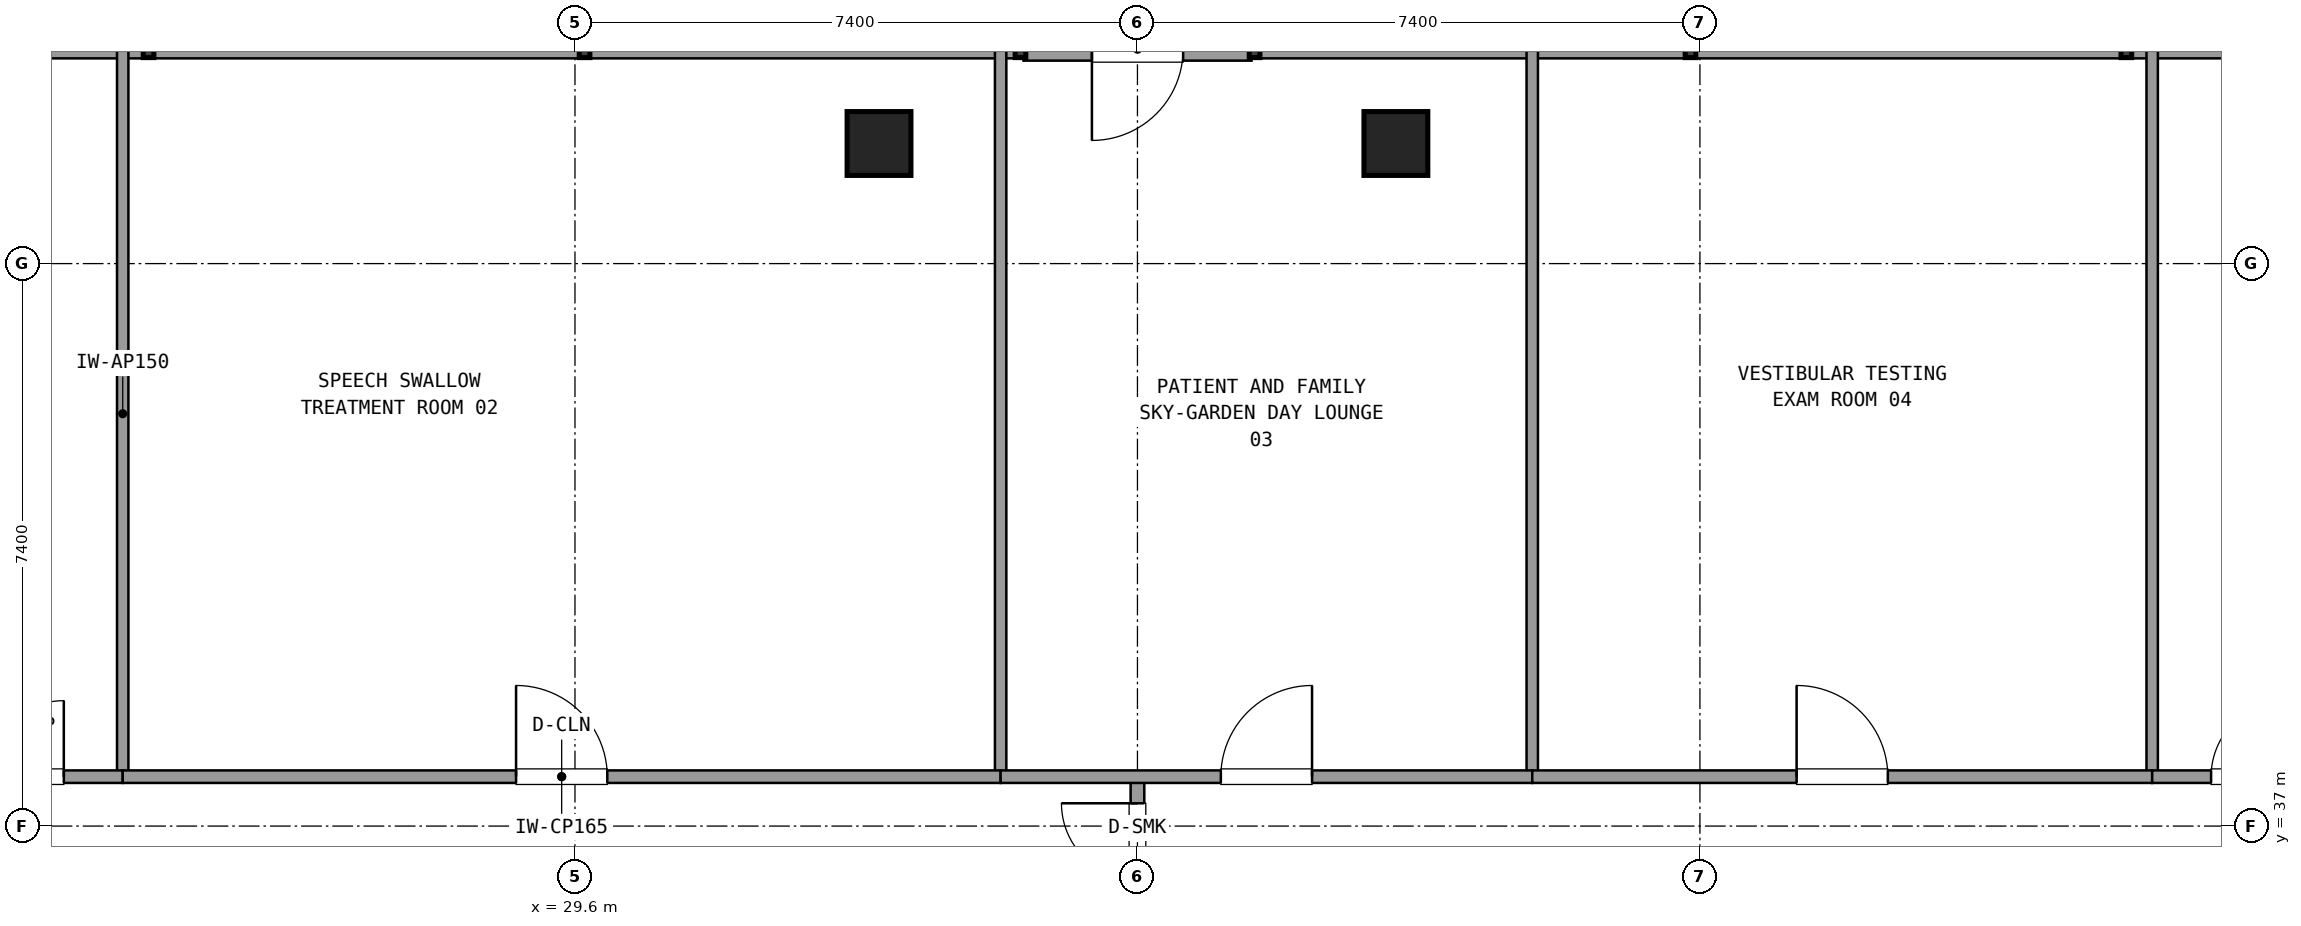
"""IFC4 building model, lengths in metres.
Left out: names, types, materials, properties, quantities, classifications, styles, units other than length and angle.
Written with IfcOpenShell. Run it as: python <this file> out.ifc"""

import sys

from ifc_helpers import new_model, si_unit, direction, frame, frame_2d, origin, origin_2d, place, context, subcontext, project, spatial, rectangle, extrude, element, fill, save


model = new_model("IFC4")
c1 = context("Model", 3, precision=1e-05, world=origin(), true_north=direction((0.0, 1.0)))
c2 = subcontext(c1, "Body", "Model", "MODEL_VIEW")
j1 = project(units=[si_unit("LENGTHUNIT", "METRE"), si_unit("PLANEANGLEUNIT", "RADIAN")], contexts=[c1])
p1 = place(None, origin())
s1 = spatial("IfcSite", under=j1, at=p1, CompositionType="ELEMENT")
p2 = place(p1, origin())
s2 = spatial("IfcBuilding", under=s1, at=p2, CompositionType="ELEMENT")
p3 = place(p2, frame((0.0, 0.0, 253.62)))
s3 = spatial("IfcBuildingStorey", under=s2, at=p3, CompositionType="ELEMENT", Elevation=253.62)
for number, where, z_axis, x_axis in (
    (1, (40.4, 45.98, 0.0), (0.0, 0.0, 1.0), (1.0, 0.0, 0.0)),
    (2, (33.6, 45.98, 0.0), (0.0, 0.0, 1.0), (1.0, 0.0, 0.0)),
):
    element("IfcColumn", number, at=place(p3, frame(where, z_axis=z_axis, x_axis=x_axis)), inside=s3, PredefinedType="COLUMN", context=c2, shape_type="SweptSolid", body=[
        extrude(rectangle(XDim=0.84, YDim=0.84, at=origin_2d()), origin(), (0.0, 0.0, 1.0), 3.6),
    ])
p4 = place(p3, frame((38.501, 47.22, 0.0), z_axis=(0.0, 0.0, 1.0), x_axis=(-1.0, 0.0, 0.0)))
e3 = element("IfcWall", 3, at=p4, inside=s3, PredefinedType="SOLIDWALL", context=c2, shape_type="SweptSolid", body=[
    extrude(rectangle(XDim=3.0, YDim=0.3, at=frame_2d((1.5, 0.0))), origin(), (0.0, 0.0, 1.0), 2.69),
])
p5 = place(p4, frame((0.9, 0.0, 0.0)))
e4 = element("IfcOpeningElement", 4, at=p5, cuts=e3, PredefinedType="OPENING", context=c2, shape_type="SweptSolid", body=[
    extrude(rectangle(XDim=1.2, YDim=2.2, at=frame_2d((0.6, 1.1))), frame((0.0, 0.16, 0.0), z_axis=(0.0, -1.0, 0.0), x_axis=(1.0, 0.0, 0.0)), (0.0, 0.0, 1.0), 0.32),
])
p6 = place(p3, frame((55.745, 47.22, 0.0), z_axis=(0.0, 0.0, 1.0), x_axis=(-1.0, 0.0, 0.0)))
e5 = element("IfcWall", 5, at=p6, inside=s3, PredefinedType="SOLIDWALL", context=c2, shape_type="SweptSolid", body=[
    extrude(rectangle(XDim=17.204, YDim=0.24, at=frame_2d((8.602, 0.0))), origin(), (0.0, 0.0, 1.0), 0.85),
])
p7 = place(p3, frame((35.461, 47.22, 0.0), z_axis=(0.0, 0.0, 1.0), x_axis=(-1.0, 0.0, 0.0)))
e6 = element("IfcWall", 6, at=p7, inside=s3, PredefinedType="SOLIDWALL", context=c2, shape_type="SweptSolid", body=[
    extrude(rectangle(XDim=17.206, YDim=0.24, at=frame_2d((8.603, 0.0))), origin(), (0.0, 0.0, 1.0), 0.85),
])
p8 = place(p3, frame((37.0, 34.95, 0.0), z_axis=(0.0, 0.0, 1.0), x_axis=(0.0, 1.0, 0.0)))
e7 = element("IfcWall", 7, at=p8, inside=s3, PredefinedType="PARTITIONING", context=c2, shape_type="SweptSolid", body=[
    extrude(rectangle(XDim=2.7, YDim=0.18, at=frame_2d((1.35, 0.0))), origin(), (0.0, 0.0, 1.0), 2.61),
])
p9 = place(p8, frame((0.35, 0.0, 0.0)))
e8 = element("IfcOpeningElement", 8, at=p9, cuts=e7, PredefinedType="OPENING", context=c2, shape_type="SweptSolid", body=[
    extrude(rectangle(XDim=2.0, YDim=2.2, at=frame_2d((1.0, 1.1))), frame((0.0, 0.1, 0.0), z_axis=(0.0, -1.0, 0.0), x_axis=(1.0, 0.0, 0.0)), (0.0, 0.0, 1.0), 0.2),
])
p10 = place(p3, frame((23.65, 37.65, 0.0), z_axis=(0.0, 0.0, 1.0), x_axis=(0.0, 1.0, 0.0)))
e9 = element("IfcWall", 9, at=p10, inside=s3, PredefinedType="PARTITIONING", context=c2, shape_type="SweptSolid", body=[
    extrude(rectangle(XDim=9.55, YDim=0.15, at=frame_2d((4.775, 0.0))), origin(), (0.0, 0.0, 1.0), 2.61),
])
p11 = place(p3, frame((21.1, 37.65, 0.0), z_axis=(0.0, 0.0, 1.0), x_axis=(1.0, 0.0, 0.0)))
e10 = element("IfcWall", 10, at=p11, inside=s3, PredefinedType="PARTITIONING", context=c2, shape_type="SweptSolid", body=[
    extrude(rectangle(XDim=2.55, YDim=0.165, at=frame_2d((1.275, 0.0))), origin(), (0.0, 0.0, 1.0), 2.61),
])
p12 = place(p11, frame((0.775, 0.0, 0.0)))
e11 = element("IfcOpeningElement", 11, at=p12, cuts=e10, PredefinedType="OPENING", context=c2, shape_type="SweptSolid", body=[
    extrude(rectangle(XDim=1.0, YDim=2.15, at=frame_2d((0.5, 1.075))), frame((0.0, 0.093, 0.0), z_axis=(0.0, -1.0, 0.0), x_axis=(1.0, 0.0, 0.0)), (0.0, 0.0, 1.0), 0.185),
])
p13 = place(p3, frame((35.2, 37.65, 0.0), z_axis=(0.0, 0.0, 1.0), x_axis=(0.0, 1.0, 0.0)))
e12 = element("IfcWall", 12, at=p13, inside=s3, PredefinedType="PARTITIONING", context=c2, shape_type="SweptSolid", body=[
    extrude(rectangle(XDim=9.55, YDim=0.15, at=frame_2d((4.775, 0.0))), origin(), (0.0, 0.0, 1.0), 2.61),
])
p14 = place(p3, frame((23.65, 37.65, 0.0), z_axis=(0.0, 0.0, 1.0), x_axis=(1.0, 0.0, 0.0)))
e13 = element("IfcWall", 13, at=p14, inside=s3, PredefinedType="PARTITIONING", context=c2, shape_type="SweptSolid", body=[
    extrude(rectangle(XDim=11.55, YDim=0.165, at=frame_2d((5.775, 0.0))), origin(), (0.0, 0.0, 1.0), 2.61),
])
p15 = place(p14, frame((5.175, 0.0, 0.0)))
e14 = element("IfcOpeningElement", 14, at=p15, cuts=e13, PredefinedType="OPENING", context=c2, shape_type="SweptSolid", body=[
    extrude(rectangle(XDim=1.2, YDim=2.15, at=frame_2d((0.6, 1.075))), frame((0.0, 0.093, 0.0), z_axis=(0.0, -1.0, 0.0), x_axis=(1.0, 0.0, 0.0)), (0.0, 0.0, 1.0), 0.185),
])
p16 = place(p3, frame((42.194, 37.65, 0.0), z_axis=(0.0, 0.0, 1.0), x_axis=(0.0, 1.0, 0.0)))
e15 = element("IfcWall", 15, at=p16, inside=s3, PredefinedType="PARTITIONING", context=c2, shape_type="SweptSolid", body=[
    extrude(rectangle(XDim=9.55, YDim=0.15, at=frame_2d((4.775, 0.0))), origin(), (0.0, 0.0, 1.0), 2.61),
])
p17 = place(p3, frame((35.2, 37.65, 0.0), z_axis=(0.0, 0.0, 1.0), x_axis=(1.0, 0.0, 0.0)))
e16 = element("IfcWall", 16, at=p17, inside=s3, PredefinedType="PARTITIONING", context=c2, shape_type="SweptSolid", body=[
    extrude(rectangle(XDim=6.994, YDim=0.165, at=frame_2d((3.497, 0.0))), origin(), (0.0, 0.0, 1.0), 2.61),
])
p18 = place(p17, frame((2.897, 0.0, 0.0)))
e17 = element("IfcOpeningElement", 17, at=p18, cuts=e16, PredefinedType="OPENING", context=c2, shape_type="SweptSolid", body=[
    extrude(rectangle(XDim=1.2, YDim=2.15, at=frame_2d((0.6, 1.075))), frame((0.0, 0.093, 0.0), z_axis=(0.0, -1.0, 0.0), x_axis=(1.0, 0.0, 0.0)), (0.0, 0.0, 1.0), 0.185),
])
p19 = place(p3, frame((50.35, 37.65, 0.0), z_axis=(0.0, 0.0, 1.0), x_axis=(0.0, 1.0, 0.0)))
e18 = element("IfcWall", 18, at=p19, inside=s3, PredefinedType="PARTITIONING", context=c2, shape_type="SweptSolid", body=[
    extrude(rectangle(XDim=9.55, YDim=0.15, at=frame_2d((4.775, 0.0))), origin(), (0.0, 0.0, 1.0), 2.61),
])
p20 = place(p3, frame((42.194, 37.65, 0.0), z_axis=(0.0, 0.0, 1.0), x_axis=(1.0, 0.0, 0.0)))
e19 = element("IfcWall", 19, at=p20, inside=s3, PredefinedType="PARTITIONING", context=c2, shape_type="SweptSolid", body=[
    extrude(rectangle(XDim=8.156, YDim=0.165, at=frame_2d((4.078, 0.0))), origin(), (0.0, 0.0, 1.0), 2.61),
])
p21 = place(p20, frame((3.478, 0.0, 0.0)))
e20 = element("IfcOpeningElement", 20, at=p21, cuts=e19, PredefinedType="OPENING", context=c2, shape_type="SweptSolid", body=[
    extrude(rectangle(XDim=1.2, YDim=2.15, at=frame_2d((0.6, 1.075))), frame((0.0, 0.093, 0.0), z_axis=(0.0, -1.0, 0.0), x_axis=(1.0, 0.0, 0.0)), (0.0, 0.0, 1.0), 0.185),
])
p22 = place(p3, frame((50.35, 37.65, 0.0), z_axis=(0.0, 0.0, 1.0), x_axis=(1.0, 0.0, 0.0)))
e21 = element("IfcWall", 21, at=p22, inside=s3, PredefinedType="PARTITIONING", context=c2, shape_type="SweptSolid", body=[
    extrude(rectangle(XDim=2.55, YDim=0.165, at=frame_2d((1.275, 0.0))), origin(), (0.0, 0.0, 1.0), 2.61),
])
p23 = place(p22, frame((0.775, 0.0, 0.0)))
e22 = element("IfcOpeningElement", 22, at=p23, cuts=e21, PredefinedType="OPENING", context=c2, shape_type="SweptSolid", body=[
    extrude(rectangle(XDim=1.0, YDim=2.15, at=frame_2d((0.5, 1.075))), frame((0.0, 0.093, 0.0), z_axis=(0.0, -1.0, 0.0), x_axis=(1.0, 0.0, 0.0)), (0.0, 0.0, 1.0), 0.185),
])
p24 = place(p9, origin())
e23 = element("IfcDoor", 23, at=p24, inside=s3, OperationType="DOUBLE_DOOR_SINGLE_SWING", PredefinedType="DOOR", context=c2, shape_type="SweptSolid", body=[
    extrude(rectangle(XDim=2.0, YDim=2.2, at=frame_2d((1.0, 1.1))), frame((0.0, 0.025, 0.0), z_axis=(0.0, -1.0, 0.0), x_axis=(1.0, 0.0, 0.0)), (0.0, 0.0, 1.0), 0.05),
])
fill(e8, e23)
p25 = place(p12, origin())
e24 = element("IfcDoor", 24, at=p25, inside=s3, OperationType="SINGLE_SWING_RIGHT", PredefinedType="DOOR", context=c2, shape_type="SweptSolid", body=[
    extrude(rectangle(XDim=1.0, YDim=2.15, at=frame_2d((0.5, 1.075))), frame((0.0, 0.025, 0.0), z_axis=(0.0, -1.0, 0.0), x_axis=(1.0, 0.0, 0.0)), (0.0, 0.0, 1.0), 0.05),
])
fill(e11, e24)
p26 = place(p15, origin())
e25 = element("IfcDoor", 25, at=p26, inside=s3, OperationType="SINGLE_SWING_LEFT", PredefinedType="DOOR", context=c2, shape_type="SweptSolid", body=[
    extrude(rectangle(XDim=1.2, YDim=2.15, at=frame_2d((0.6, 1.075))), frame((0.0, 0.025, 0.0), z_axis=(0.0, -1.0, 0.0), x_axis=(1.0, 0.0, 0.0)), (0.0, 0.0, 1.0), 0.05),
])
fill(e14, e25)
p27 = place(p18, origin())
e26 = element("IfcDoor", 26, at=p27, inside=s3, OperationType="SINGLE_SWING_RIGHT", PredefinedType="DOOR", context=c2, shape_type="SweptSolid", body=[
    extrude(rectangle(XDim=1.2, YDim=2.15, at=frame_2d((0.6, 1.075))), frame((0.0, 0.025, 0.0), z_axis=(0.0, -1.0, 0.0), x_axis=(1.0, 0.0, 0.0)), (0.0, 0.0, 1.0), 0.05),
])
fill(e17, e26)
p28 = place(p21, origin())
e27 = element("IfcDoor", 27, at=p28, inside=s3, OperationType="SINGLE_SWING_LEFT", PredefinedType="DOOR", context=c2, shape_type="SweptSolid", body=[
    extrude(rectangle(XDim=1.2, YDim=2.15, at=frame_2d((0.6, 1.075))), frame((0.0, 0.025, 0.0), z_axis=(0.0, -1.0, 0.0), x_axis=(1.0, 0.0, 0.0)), (0.0, 0.0, 1.0), 0.05),
])
fill(e20, e27)
p29 = place(p23, origin())
e28 = element("IfcDoor", 28, at=p29, inside=s3, OperationType="SINGLE_SWING_RIGHT", PredefinedType="DOOR", context=c2, shape_type="SweptSolid", body=[
    extrude(rectangle(XDim=1.0, YDim=2.15, at=frame_2d((0.5, 1.075))), frame((0.0, 0.025, 0.0), z_axis=(0.0, -1.0, 0.0), x_axis=(1.0, 0.0, 0.0)), (0.0, 0.0, 1.0), 0.05),
])
fill(e22, e28)
save(model, sys.argv[1])
